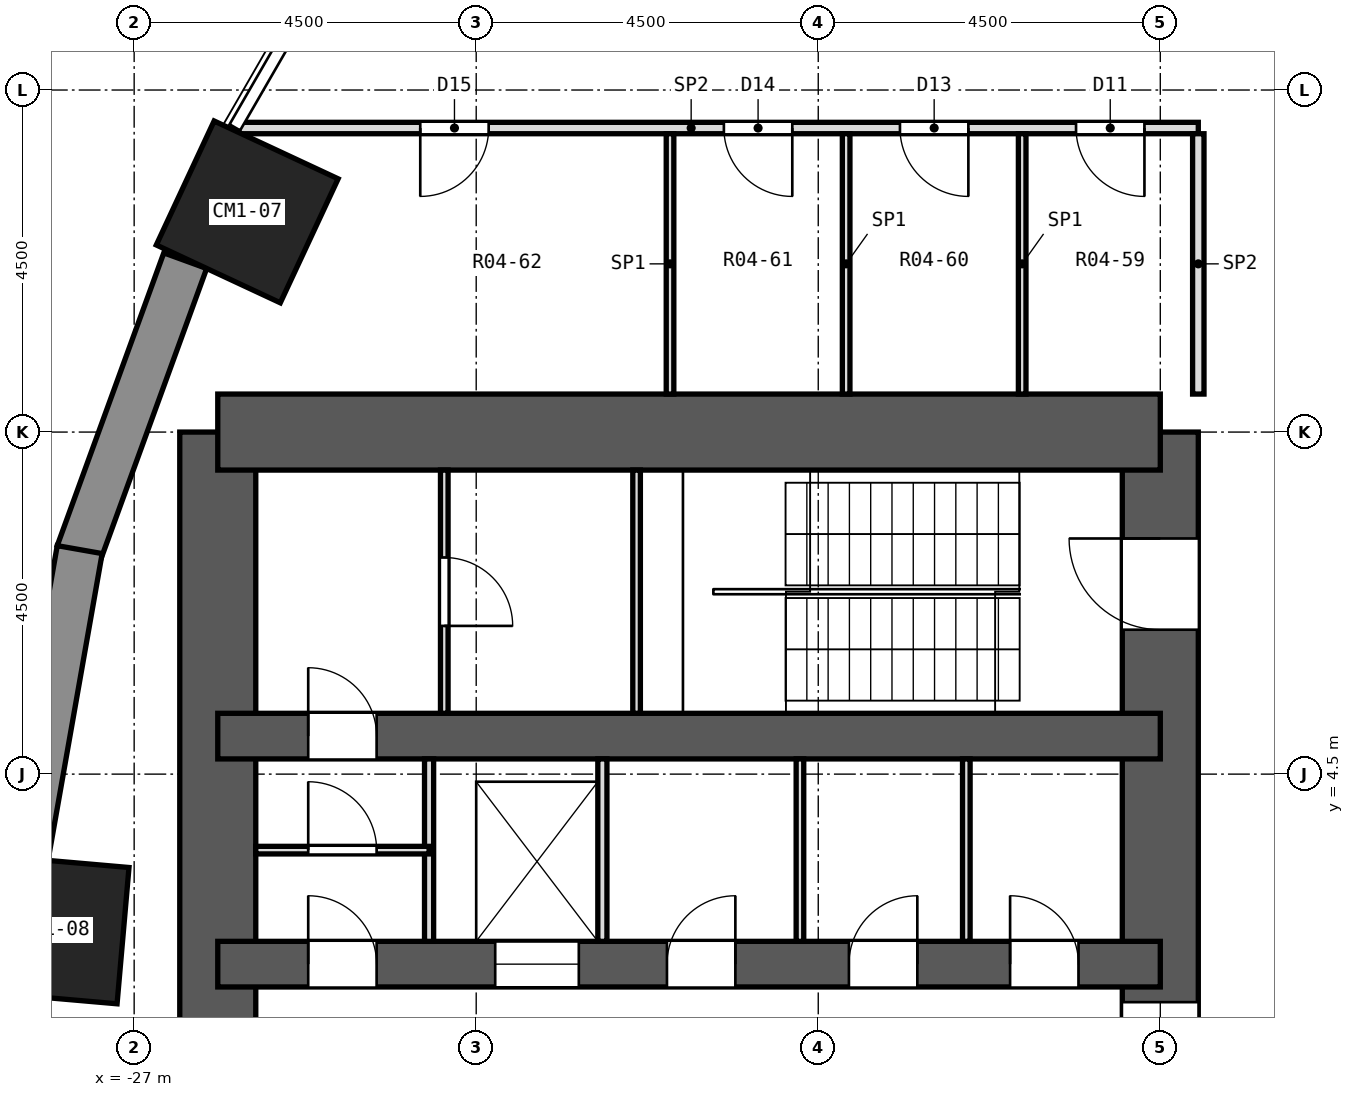
"""IFC4 building model, lengths in metres.
Left out: names, types, materials, properties, quantities, classifications, styles, units other than length and angle.
Written with IfcOpenShell. Run it as: python <this file> out.ifc"""

import sys

from ifc_helpers import new_model, si_unit, direction, frame, frame_2d, origin, origin_2d, place, context, subcontext, project, spatial, rectangle, extrude, element, fill, save


model = new_model("IFC4")
c1 = context("Model", 3, precision=1e-05, world=origin(), true_north=direction((0.0, 1.0)))
c2 = subcontext(c1, "Body", "Model", "MODEL_VIEW")
j1 = project(units=[si_unit("LENGTHUNIT", "METRE"), si_unit("PLANEANGLEUNIT", "RADIAN")], contexts=[c1])
p1 = place(None, origin())
s1 = spatial("IfcSite", under=j1, at=p1, CompositionType="ELEMENT")
p2 = place(p1, origin())
s2 = spatial("IfcBuilding", under=s1, at=p2, CompositionType="ELEMENT")
p3 = place(p2, frame((0.0, 0.0, 5.0)))
s3 = spatial("IfcBuildingStorey", under=s2, at=p3, CompositionType="ELEMENT", Elevation=5.0)
for number, where, z_axis, x_axis in (
    (1, (-25.512, 11.897, 0.0), (0.0, 0.0, 1.0), (-0.906, 0.423, 0.0)),
    (2, (-28.043, 2.453, 0.0), (0.0, 0.0, 1.0), (-0.996, 0.087, 0.0)),
):
    element("IfcColumn", number, at=place(p3, frame(where, z_axis=z_axis, x_axis=x_axis)), inside=s3, PredefinedType="COLUMN", context=c2, shape_type="SweptSolid", body=[
        extrude(rectangle(XDim=1.8, YDim=1.8, at=origin_2d()), origin(), (0.0, 0.0, 1.0), 4.2),
    ])
p4 = place(p3, frame((-13.5, -9.0, 0.0), z_axis=(0.0, 0.0, 1.0), x_axis=(0.0, 1.0, 0.0)))
e3 = element("IfcWall", 3, at=p4, inside=s3, PredefinedType="SHEAR", context=c2, shape_type="SweptSolid", body=[
    extrude(rectangle(XDim=18.0, YDim=1.0, at=frame_2d((9.0, 0.0))), origin(), (0.0, 0.0, 1.0), 4.2),
])
p5 = place(p4, frame((15.4, 0.0, 0.0)))
e4 = element("IfcOpeningElement", 4, at=p5, cuts=e3, PredefinedType="OPENING", context=c2, shape_type="SweptSolid", body=[
    extrude(rectangle(XDim=1.2, YDim=2.1, at=frame_2d((0.6, 1.05))), frame((0.0, 0.512, 0.0), z_axis=(0.0, -1.0, 0.0), x_axis=(1.0, 0.0, 0.0)), (0.0, 0.0, 1.0), 1.024),
])
p6 = place(p4, frame((1.4, 0.0, 0.0)))
e5 = element("IfcOpeningElement", 5, at=p6, cuts=e3, PredefinedType="OPENING", context=c2, shape_type="SweptSolid", body=[
    extrude(rectangle(XDim=1.2, YDim=2.1, at=frame_2d((0.6, 1.05))), frame((0.0, 0.512, 0.0), z_axis=(0.0, -1.0, 0.0), x_axis=(1.0, 0.0, 0.0)), (0.0, 0.0, 1.0), 1.024),
])
p7 = place(p4, frame((7.5, 0.0, 0.0)))
e6 = element("IfcOpeningElement", 6, at=p7, cuts=e3, PredefinedType="OPENING", context=c2, shape_type="SweptSolid", body=[
    extrude(rectangle(XDim=3.0, YDim=2.4, at=frame_2d((1.5, 1.2))), frame((0.0, 0.512, 0.0), z_axis=(0.0, -1.0, 0.0), x_axis=(1.0, 0.0, 0.0)), (0.0, 0.0, 1.0), 1.024),
])
p8 = place(p3, frame((-25.9, -9.0, 0.0), z_axis=(0.0, 0.0, 1.0), x_axis=(0.0, 1.0, 0.0)))
e7 = element("IfcWall", 7, at=p8, inside=s3, PredefinedType="SHEAR", context=c2, shape_type="SweptSolid", body=[
    extrude(rectangle(XDim=18.0, YDim=1.0, at=frame_2d((9.0, 0.0))), origin(), (0.0, 0.0, 1.0), 4.2),
])
p9 = place(p3, frame((-13.5, 9.0, 0.0), z_axis=(0.0, 0.0, 1.0), x_axis=(-1.0, 0.0, 0.0)))
e8 = element("IfcWall", 8, at=p9, inside=s3, PredefinedType="SHEAR", context=c2, shape_type="SweptSolid", body=[
    extrude(rectangle(XDim=12.4, YDim=1.0, at=frame_2d((6.2, 0.0))), origin(), (0.0, 0.0, 1.0), 4.2),
])
p10 = place(p3, frame((-13.5, 5.0, 0.0), z_axis=(0.0, 0.0, 1.0), x_axis=(-1.0, 0.0, 0.0)))
e9 = element("IfcWall", 9, at=p10, inside=s3, PredefinedType="SHEAR", context=c2, shape_type="SweptSolid", body=[
    extrude(rectangle(XDim=12.4, YDim=0.6, at=frame_2d((6.2, 0.0))), origin(), (0.0, 0.0, 1.0), 4.2),
])
p11 = place(p10, frame((10.31, 0.0, 0.0)))
e10 = element("IfcOpeningElement", 10, at=p11, cuts=e9, PredefinedType="OPENING", context=c2, shape_type="SweptSolid", body=[
    extrude(rectangle(XDim=0.9, YDim=2.1, at=frame_2d((0.45, 1.05))), frame((0.0, 0.312, 0.0), z_axis=(0.0, -1.0, 0.0), x_axis=(1.0, 0.0, 0.0)), (0.0, 0.0, 1.0), 0.624),
])
p12 = place(p3, frame((-13.5, 2.0, 0.0), z_axis=(0.0, 0.0, 1.0), x_axis=(-1.0, 0.0, 0.0)))
e11 = element("IfcWall", 11, at=p12, inside=s3, PredefinedType="SHEAR", context=c2, shape_type="SweptSolid", body=[
    extrude(rectangle(XDim=12.4, YDim=0.6, at=frame_2d((6.2, 0.0))), origin(), (0.0, 0.0, 1.0), 4.2),
])
p13 = place(p12, frame((7.65, 0.0, 0.0)))
e12 = element("IfcOpeningElement", 12, at=p13, cuts=e11, PredefinedType="OPENING", context=c2, shape_type="SweptSolid", body=[
    extrude(rectangle(XDim=1.1, YDim=2.1, at=frame_2d((0.55, 1.05))), frame((0.0, 0.312, 0.0), z_axis=(0.0, -1.0, 0.0), x_axis=(1.0, 0.0, 0.0)), (0.0, 0.0, 1.0), 0.624),
])
p14 = place(p12, frame((1.076, 0.0, 0.0)))
e13 = element("IfcOpeningElement", 13, at=p14, cuts=e11, PredefinedType="OPENING", context=c2, shape_type="SweptSolid", body=[
    extrude(rectangle(XDim=0.9, YDim=2.1, at=frame_2d((0.45, 1.05))), frame((0.0, 0.312, 0.0), z_axis=(0.0, -1.0, 0.0), x_axis=(1.0, 0.0, 0.0)), (0.0, 0.0, 1.0), 0.624),
])
p15 = place(p12, frame((3.196, 0.0, 0.0)))
e14 = element("IfcOpeningElement", 14, at=p15, cuts=e11, PredefinedType="OPENING", context=c2, shape_type="SweptSolid", body=[
    extrude(rectangle(XDim=0.9, YDim=2.1, at=frame_2d((0.45, 1.05))), frame((0.0, 0.312, 0.0), z_axis=(0.0, -1.0, 0.0), x_axis=(1.0, 0.0, 0.0)), (0.0, 0.0, 1.0), 0.624),
])
p16 = place(p12, frame((5.59, 0.0, 0.0)))
e15 = element("IfcOpeningElement", 15, at=p16, cuts=e11, PredefinedType="OPENING", context=c2, shape_type="SweptSolid", body=[
    extrude(rectangle(XDim=0.9, YDim=2.1, at=frame_2d((0.45, 1.05))), frame((0.0, 0.312, 0.0), z_axis=(0.0, -1.0, 0.0), x_axis=(1.0, 0.0, 0.0)), (0.0, 0.0, 1.0), 0.624),
])
p17 = place(p12, frame((10.31, 0.0, 0.0)))
e16 = element("IfcOpeningElement", 16, at=p17, cuts=e11, PredefinedType="OPENING", context=c2, shape_type="SweptSolid", body=[
    extrude(rectangle(XDim=0.9, YDim=2.1, at=frame_2d((0.45, 1.05))), frame((0.0, 0.312, 0.0), z_axis=(0.0, -1.0, 0.0), x_axis=(1.0, 0.0, 0.0)), (0.0, 0.0, 1.0), 0.624),
])
p18 = place(p3, frame((-26.328, 11.255, 0.0), z_axis=(0.0, 0.0, 1.0), x_axis=(-0.342034744565, -0.939687306241, 0.0)))
e17 = element("IfcWall", 17, at=p18, inside=s3, PredefinedType="SOLIDWALL", context=c2, shape_type="SweptSolid", body=[
    extrude(rectangle(XDim=4.099, YDim=0.6, at=frame_2d((2.05, 0.0))), origin(), (0.0, 0.0, 1.0), 3.65),
])
p19 = place(p3, frame((-27.716, 7.454, 0.0), z_axis=(0.0, 0.0, 1.0), x_axis=(-0.173673210505, -0.984803338719, 0.0)))
e18 = element("IfcWall", 18, at=p19, inside=s3, PredefinedType="SOLIDWALL", context=c2, shape_type="SweptSolid", body=[
    extrude(rectangle(XDim=4.099, YDim=0.6, at=frame_2d((2.05, 0.0))), origin(), (0.0, 0.0, 1.0), 3.65),
])
p20 = place(p3, frame((-25.622, 13.0, 0.0), z_axis=(0.0, 0.0, 1.0), x_axis=(1.0, 0.0, 0.0)))
e19 = element("IfcWall", 19, at=p20, inside=s3, PredefinedType="PARTITIONING", context=c2, shape_type="SweptSolid", body=[
    extrude(rectangle(XDim=12.622, YDim=0.15, at=frame_2d((6.311, 0.0))), origin(), (0.0, 0.0, 1.0), 3.65),
])
p21 = place(p20, frame((11.013, 0.0, 0.0)))
e20 = element("IfcOpeningElement", 20, at=p21, cuts=e19, PredefinedType="OPENING", context=c2, shape_type="SweptSolid", body=[
    extrude(rectangle(XDim=0.9, YDim=2.1, at=frame_2d((0.45, 1.05))), frame((0.0, 0.087, 0.0), z_axis=(0.0, -1.0, 0.0), x_axis=(1.0, 0.0, 0.0)), (0.0, 0.0, 1.0), 0.174),
])
p22 = place(p20, frame((8.697, 0.0, 0.0)))
e21 = element("IfcOpeningElement", 21, at=p22, cuts=e19, PredefinedType="OPENING", context=c2, shape_type="SweptSolid", body=[
    extrude(rectangle(XDim=0.9, YDim=2.1, at=frame_2d((0.45, 1.05))), frame((0.0, 0.087, 0.0), z_axis=(0.0, -1.0, 0.0), x_axis=(1.0, 0.0, 0.0)), (0.0, 0.0, 1.0), 0.174),
])
p23 = place(p20, frame((6.381, 0.0, 0.0)))
e22 = element("IfcOpeningElement", 22, at=p23, cuts=e19, PredefinedType="OPENING", context=c2, shape_type="SweptSolid", body=[
    extrude(rectangle(XDim=0.9, YDim=2.1, at=frame_2d((0.45, 1.05))), frame((0.0, 0.087, 0.0), z_axis=(0.0, -1.0, 0.0), x_axis=(1.0, 0.0, 0.0)), (0.0, 0.0, 1.0), 0.174),
])
p24 = place(p20, frame((2.386, 0.0, 0.0)))
e23 = element("IfcOpeningElement", 23, at=p24, cuts=e19, PredefinedType="OPENING", context=c2, shape_type="SweptSolid", body=[
    extrude(rectangle(XDim=0.9, YDim=2.1, at=frame_2d((0.45, 1.05))), frame((0.0, 0.087, 0.0), z_axis=(0.0, -1.0, 0.0), x_axis=(1.0, 0.0, 0.0)), (0.0, 0.0, 1.0), 0.174),
])
p25 = place(p3, frame((-13.0, 9.5, 0.0), z_axis=(0.0, 0.0, 1.0), x_axis=(0.0, 1.0, 0.0)))
e24 = element("IfcWall", 24, at=p25, inside=s3, PredefinedType="PARTITIONING", context=c2, shape_type="SweptSolid", body=[
    extrude(rectangle(XDim=3.425, YDim=0.15, at=frame_2d((1.712, 0.0))), origin(), (0.0, 0.0, 1.0), 3.65),
])
for number, where, z_axis, x_axis in (
    (25, (-15.317, 9.5, 0.0), (0.0, 0.0, 1.0), (0.0, 1.0, 0.0)),
    (26, (-17.633, 9.5, 0.0), (0.0, 0.0, 1.0), (0.0, 1.0, 0.0)),
    (27, (-19.95, 9.5, 0.0), (0.0, 0.0, 1.0), (0.0, 1.0, 0.0)),
):
    element("IfcWall", number, at=place(p3, frame(where, z_axis=z_axis, x_axis=x_axis)), inside=s3, PredefinedType="PARTITIONING", context=c2, shape_type="SweptSolid", body=[
        extrude(rectangle(XDim=3.425, YDim=0.1, at=frame_2d((1.712, 0.0))), origin(), (0.0, 0.0, 1.0), 3.65),
    ])
for number, where, z_axis, x_axis in (
    (28, (-16.052, 2.3, 0.0), (0.0, 0.0, 1.0), (0.0, 1.0, 0.0)),
    (29, (-18.241, 2.3, 0.0), (0.0, 0.0, 1.0), (0.0, 1.0, 0.0)),
):
    element("IfcWall", number, at=place(p3, frame(where, z_axis=z_axis, x_axis=x_axis)), inside=s3, PredefinedType="PARTITIONING", context=c2, shape_type="SweptSolid", body=[
        extrude(rectangle(XDim=2.4, YDim=0.1, at=frame_2d((1.2, 0.0))), origin(), (0.0, 0.0, 1.0), 3.65),
    ])
for number, where, z_axis, x_axis in (
    (30, (-20.84, 2.3, 0.0), (0.0, 0.0, 1.0), (0.0, 1.0, 0.0)),
    (31, (-23.12, 2.3, 0.0), (0.0, 0.0, 1.0), (0.0, 1.0, 0.0)),
):
    element("IfcWall", number, at=place(p3, frame(where, z_axis=z_axis, x_axis=x_axis)), inside=s3, PredefinedType="PARTITIONING", context=c2, shape_type="SweptSolid", body=[
        extrude(rectangle(XDim=2.4, YDim=0.12, at=frame_2d((1.2, 0.0))), origin(), (0.0, 0.0, 1.0), 3.65),
    ])
p26 = place(p3, frame((-23.12, 3.5, 0.0), z_axis=(0.0, 0.0, 1.0), x_axis=(-1.0, 0.0, 0.0)))
e32 = element("IfcWall", 32, at=p26, inside=s3, PredefinedType="PARTITIONING", context=c2, shape_type="SweptSolid", body=[
    extrude(rectangle(XDim=2.28, YDim=0.1, at=frame_2d((1.14, 0.0))), origin(), (0.0, 0.0, 1.0), 3.65),
])
p27 = place(p26, frame((0.69, 0.0, 0.0)))
e33 = element("IfcOpeningElement", 33, at=p27, cuts=e32, PredefinedType="OPENING", context=c2, shape_type="SweptSolid", body=[
    extrude(rectangle(XDim=0.9, YDim=2.1, at=frame_2d((0.45, 1.05))), frame((0.0, 0.062, 0.0), z_axis=(0.0, -1.0, 0.0), x_axis=(1.0, 0.0, 0.0)), (0.0, 0.0, 1.0), 0.124),
])
p28 = place(p3, frame((-20.39, 5.3, 0.0), z_axis=(0.0, 0.0, 1.0), x_axis=(0.0, 1.0, 0.0)))
e34 = element("IfcWall", 34, at=p28, inside=s3, PredefinedType="PARTITIONING", context=c2, shape_type="SweptSolid", body=[
    extrude(rectangle(XDim=3.2, YDim=0.1, at=frame_2d((1.6, 0.0))), origin(), (0.0, 0.0, 1.0), 3.65),
])
p29 = place(p3, frame((-22.92, 5.3, 0.0), z_axis=(0.0, 0.0, 1.0), x_axis=(0.0, 1.0, 0.0)))
e35 = element("IfcWall", 35, at=p29, inside=s3, PredefinedType="PARTITIONING", context=c2, shape_type="SweptSolid", body=[
    extrude(rectangle(XDim=3.2, YDim=0.1, at=frame_2d((1.6, 0.0))), origin(), (0.0, 0.0, 1.0), 3.65),
])
p30 = place(p29, frame((1.15, 0.0, 0.0)))
e36 = element("IfcOpeningElement", 36, at=p30, cuts=e35, PredefinedType="OPENING", context=c2, shape_type="SweptSolid", body=[
    extrude(rectangle(XDim=0.9, YDim=2.1, at=frame_2d((0.45, 1.05))), frame((0.0, 0.062, 0.0), z_axis=(0.0, -1.0, 0.0), x_axis=(1.0, 0.0, 0.0)), (0.0, 0.0, 1.0), 0.124),
])
p31 = place(p21, frame((0.9, 0.0, 0.0), z_axis=(0.0, 0.0, 1.0), x_axis=(-1.0, 0.0, 0.0)))
e37 = element("IfcDoor", 37, at=p31, inside=s3, OperationType="SINGLE_SWING_LEFT", PredefinedType="DOOR", context=c2, shape_type="SweptSolid", body=[
    extrude(rectangle(XDim=0.9, YDim=2.1, at=frame_2d((0.45, 1.05))), frame((0.0, 0.025, 0.0), z_axis=(0.0, -1.0, 0.0), x_axis=(1.0, 0.0, 0.0)), (0.0, 0.0, 1.0), 0.05),
])
fill(e20, e37)
p32 = place(p22, frame((0.9, 0.0, 0.0), z_axis=(0.0, 0.0, 1.0), x_axis=(-1.0, 0.0, 0.0)))
e38 = element("IfcDoor", 38, at=p32, inside=s3, OperationType="SINGLE_SWING_LEFT", PredefinedType="DOOR", context=c2, shape_type="SweptSolid", body=[
    extrude(rectangle(XDim=0.9, YDim=2.1, at=frame_2d((0.45, 1.05))), frame((0.0, 0.025, 0.0), z_axis=(0.0, -1.0, 0.0), x_axis=(1.0, 0.0, 0.0)), (0.0, 0.0, 1.0), 0.05),
])
fill(e21, e38)
p33 = place(p23, frame((0.9, 0.0, 0.0), z_axis=(0.0, 0.0, 1.0), x_axis=(-1.0, 0.0, 0.0)))
e39 = element("IfcDoor", 39, at=p33, inside=s3, OperationType="SINGLE_SWING_LEFT", PredefinedType="DOOR", context=c2, shape_type="SweptSolid", body=[
    extrude(rectangle(XDim=0.9, YDim=2.1, at=frame_2d((0.45, 1.05))), frame((0.0, 0.025, 0.0), z_axis=(0.0, -1.0, 0.0), x_axis=(1.0, 0.0, 0.0)), (0.0, 0.0, 1.0), 0.05),
])
fill(e22, e39)
p34 = place(p24, frame((0.9, 0.0, 0.0), z_axis=(0.0, 0.0, 1.0), x_axis=(-1.0, 0.0, 0.0)))
e40 = element("IfcDoor", 40, at=p34, inside=s3, OperationType="SINGLE_SWING_RIGHT", PredefinedType="DOOR", context=c2, shape_type="SweptSolid", body=[
    extrude(rectangle(XDim=0.9, YDim=2.1, at=frame_2d((0.45, 1.05))), frame((0.0, 0.025, 0.0), z_axis=(0.0, -1.0, 0.0), x_axis=(1.0, 0.0, 0.0)), (0.0, 0.0, 1.0), 0.05),
])
fill(e23, e40)
p35 = place(p13, origin())
e41 = element("IfcDoor", 41, at=p35, inside=s3, OperationType="DOUBLE_DOOR_SLIDING", PredefinedType="DOOR", context=c2, shape_type="SweptSolid", body=[
    extrude(rectangle(XDim=1.1, YDim=2.1, at=frame_2d((0.55, 1.05))), frame((0.0, 0.025, 0.0), z_axis=(0.0, -1.0, 0.0), x_axis=(1.0, 0.0, 0.0)), (0.0, 0.0, 1.0), 0.05),
])
fill(e12, e41)
p36 = place(p14, frame((0.9, 0.0, 0.0), z_axis=(0.0, 0.0, 1.0), x_axis=(-1.0, 0.0, 0.0)))
e42 = element("IfcDoor", 42, at=p36, inside=s3, OperationType="SINGLE_SWING_LEFT", PredefinedType="DOOR", context=c2, shape_type="SweptSolid", body=[
    extrude(rectangle(XDim=0.9, YDim=2.1, at=frame_2d((0.45, 1.05))), frame((0.0, 0.025, 0.0), z_axis=(0.0, -1.0, 0.0), x_axis=(1.0, 0.0, 0.0)), (0.0, 0.0, 1.0), 0.05),
])
fill(e13, e42)
p37 = place(p15, frame((0.9, 0.0, 0.0), z_axis=(0.0, 0.0, 1.0), x_axis=(-1.0, 0.0, 0.0)))
e43 = element("IfcDoor", 43, at=p37, inside=s3, OperationType="SINGLE_SWING_RIGHT", PredefinedType="DOOR", context=c2, shape_type="SweptSolid", body=[
    extrude(rectangle(XDim=0.9, YDim=2.1, at=frame_2d((0.45, 1.05))), frame((0.0, 0.025, 0.0), z_axis=(0.0, -1.0, 0.0), x_axis=(1.0, 0.0, 0.0)), (0.0, 0.0, 1.0), 0.05),
])
fill(e14, e43)
p38 = place(p16, frame((0.9, 0.0, 0.0), z_axis=(0.0, 0.0, 1.0), x_axis=(-1.0, 0.0, 0.0)))
e44 = element("IfcDoor", 44, at=p38, inside=s3, OperationType="SINGLE_SWING_RIGHT", PredefinedType="DOOR", context=c2, shape_type="SweptSolid", body=[
    extrude(rectangle(XDim=0.9, YDim=2.1, at=frame_2d((0.45, 1.05))), frame((0.0, 0.025, 0.0), z_axis=(0.0, -1.0, 0.0), x_axis=(1.0, 0.0, 0.0)), (0.0, 0.0, 1.0), 0.05),
])
fill(e15, e44)
p39 = place(p17, frame((0.9, 0.0, 0.0), z_axis=(0.0, 0.0, 1.0), x_axis=(-1.0, 0.0, 0.0)))
e45 = element("IfcDoor", 45, at=p39, inside=s3, OperationType="SINGLE_SWING_LEFT", PredefinedType="DOOR", context=c2, shape_type="SweptSolid", body=[
    extrude(rectangle(XDim=0.9, YDim=2.1, at=frame_2d((0.45, 1.05))), frame((0.0, 0.025, 0.0), z_axis=(0.0, -1.0, 0.0), x_axis=(1.0, 0.0, 0.0)), (0.0, 0.0, 1.0), 0.05),
])
fill(e16, e45)
p40 = place(p27, frame((0.9, 0.0, 0.0), z_axis=(0.0, 0.0, 1.0), x_axis=(-1.0, 0.0, 0.0)))
e46 = element("IfcDoor", 46, at=p40, inside=s3, OperationType="SINGLE_SWING_LEFT", PredefinedType="DOOR", context=c2, shape_type="SweptSolid", body=[
    extrude(rectangle(XDim=0.9, YDim=2.1, at=frame_2d((0.45, 1.05))), frame((0.0, 0.025, 0.0), z_axis=(0.0, -1.0, 0.0), x_axis=(1.0, 0.0, 0.0)), (0.0, 0.0, 1.0), 0.05),
])
fill(e33, e46)
p41 = place(p30, frame((0.9, 0.0, 0.0), z_axis=(0.0, 0.0, 1.0), x_axis=(-1.0, 0.0, 0.0)))
e47 = element("IfcDoor", 47, at=p41, inside=s3, OperationType="SINGLE_SWING_RIGHT", PredefinedType="DOOR", context=c2, shape_type="SweptSolid", body=[
    extrude(rectangle(XDim=0.9, YDim=2.1, at=frame_2d((0.45, 1.05))), frame((0.0, 0.025, 0.0), z_axis=(0.0, -1.0, 0.0), x_axis=(1.0, 0.0, 0.0)), (0.0, 0.0, 1.0), 0.05),
])
fill(e36, e47)
p42 = place(p11, frame((0.9, 0.0, 0.0), z_axis=(0.0, 0.0, 1.0), x_axis=(-1.0, 0.0, 0.0)))
e48 = element("IfcDoor", 48, at=p42, inside=s3, OperationType="SINGLE_SWING_LEFT", PredefinedType="DOOR", context=c2, shape_type="SweptSolid", body=[
    extrude(rectangle(XDim=0.9, YDim=2.1, at=frame_2d((0.45, 1.05))), frame((0.0, 0.025, 0.0), z_axis=(0.0, -1.0, 0.0), x_axis=(1.0, 0.0, 0.0)), (0.0, 0.0, 1.0), 0.05),
])
fill(e10, e48)
p43 = place(p5, origin())
e49 = element("IfcDoor", 49, at=p43, inside=s3, OperationType="SINGLE_SWING_RIGHT", PredefinedType="DOOR", context=c2, shape_type="SweptSolid", body=[
    extrude(rectangle(XDim=1.2, YDim=2.1, at=frame_2d((0.6, 1.05))), frame((0.0, 0.025, 0.0), z_axis=(0.0, -1.0, 0.0), x_axis=(1.0, 0.0, 0.0)), (0.0, 0.0, 1.0), 0.05),
])
fill(e4, e49)
p44 = place(p7, origin())
e50 = element("IfcDoor", 50, at=p44, inside=s3, OperationType="DOUBLE_DOOR_SLIDING", PredefinedType="DOOR", context=c2, shape_type="SweptSolid", body=[
    extrude(rectangle(XDim=3.0, YDim=2.4, at=frame_2d((1.5, 1.2))), frame((0.0, 0.025, 0.0), z_axis=(0.0, -1.0, 0.0), x_axis=(1.0, 0.0, 0.0)), (0.0, 0.0, 1.0), 0.05),
])
fill(e6, e50)
save(model, sys.argv[1])
